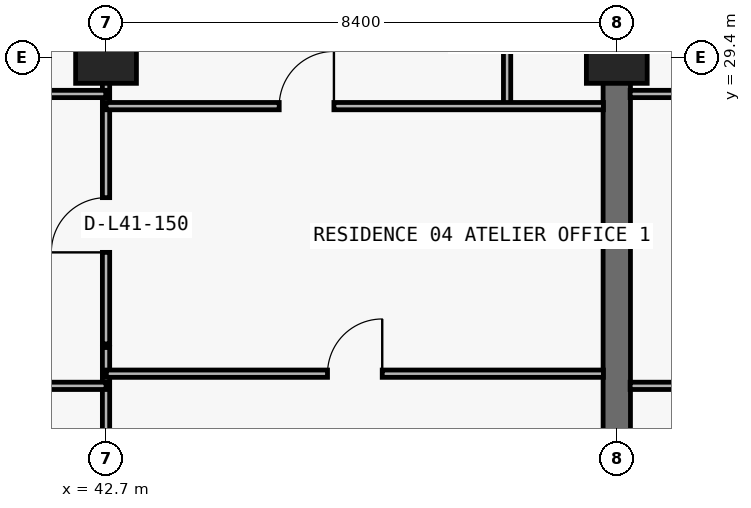
"""IFC4 building model, lengths in metres.
Left out: names, types, materials, properties, quantities, classifications, styles, units other than length and angle.
Written with IfcOpenShell. Run it as: python <this file> out.ifc"""

import sys

from ifc_helpers import new_model, si_unit, direction, frame, frame_2d, origin, origin_2d, place, context, subcontext, project, spatial, rectangle, extrude, element, fill, save


model = new_model("IFC4")
c1 = context("Model", 3, precision=1e-05, world=origin(), true_north=direction((0.0, 1.0)))
c2 = subcontext(c1, "Body", "Model", "MODEL_VIEW")
j1 = project(units=[si_unit("LENGTHUNIT", "METRE"), si_unit("PLANEANGLEUNIT", "RADIAN")], contexts=[c1])
p1 = place(None, origin())
s1 = spatial("IfcSite", under=j1, at=p1, CompositionType="ELEMENT")
p2 = place(p1, origin())
s2 = spatial("IfcBuilding", under=s1, at=p2, CompositionType="ELEMENT")
p3 = place(p2, frame((0.0, 0.0, 148.8)))
s3 = spatial("IfcBuildingStorey", under=s2, at=p3, CompositionType="ELEMENT", Elevation=148.8)
for number, where, z_axis, x_axis in (
    (1, (42.7, 29.4, 0.0), (0.0, 0.0, 1.0), (1.0, 0.0, 0.0)),
    (2, (51.1, 29.4, 0.0), (0.0, 0.0, 1.0), (1.0, 0.0, 0.0)),
):
    element("IfcColumn", number, at=place(p3, frame(where, z_axis=z_axis, x_axis=x_axis)), inside=s3, PredefinedType="COLUMN", context=c2, shape_type="SweptSolid", body=[
        extrude(rectangle(XDim=1.0, YDim=0.85, at=origin_2d()), origin(), (0.0, 0.0, 1.0), 3.0),
    ])
p4 = place(p3, frame((51.1, 20.8, 0.0), z_axis=(0.0, 0.0, 1.0), x_axis=(0.0, 1.0, 0.0)))
e3 = element("IfcWall", 3, at=p4, inside=s3, PredefinedType="SHEAR", context=c2, shape_type="SweptSolid", body=[
    extrude(rectangle(XDim=8.6, YDim=0.45, at=frame_2d((4.3, 0.0))), origin(), (0.0, 0.0, 1.0), 3.0),
])
p5 = place(p3, frame((42.7, 8.84, 0.0), z_axis=(0.0, 0.0, 1.0), x_axis=(0.0, 1.0, 0.0)))
e4 = element("IfcWall", 4, at=p5, inside=s3, PredefinedType="PARTITIONING", context=c2, shape_type="SweptSolid", body=[
    extrude(rectangle(XDim=15.79, YDim=0.12, at=frame_2d((7.895, 0.0))), origin(), (0.0, 0.0, 1.0), 2.124),
])
p6 = place(p3, frame((42.7, 24.69, 0.0), z_axis=(0.0, 0.0, 1.0), x_axis=(0.0, 1.0, 0.0)))
e5 = element("IfcWall", 5, at=p6, inside=s3, PredefinedType="PARTITIONING", context=c2, shape_type="SweptSolid", body=[
    extrude(rectangle(XDim=5.09, YDim=0.12, at=frame_2d((2.545, 0.0))), origin(), (0.0, 0.0, 1.0), 2.124),
])
p7 = place(p6, frame((1.505, 0.0, 0.0)))
e6 = element("IfcOpeningElement", 6, at=p7, cuts=e5, PredefinedType="OPENING", context=c2, shape_type="SweptSolid", body=[
    extrude(rectangle(XDim=0.9, YDim=2.074, at=frame_2d((0.45, 1.037))), frame((0.0, 0.07, 0.0), z_axis=(0.0, -1.0, 0.0), x_axis=(1.0, 0.0, 0.0)), (0.0, 0.0, 1.0), 0.14),
])
p8 = place(p3, frame((49.296, 28.6, 0.0), z_axis=(0.0, 0.0, 1.0), x_axis=(0.0, 1.0, 0.0)))
e7 = element("IfcWall", 7, at=p8, inside=s3, PredefinedType="PARTITIONING", context=c2, shape_type="SweptSolid", body=[
    extrude(rectangle(XDim=1.18, YDim=0.12, at=frame_2d((0.59, 0.0))), origin(), (0.0, 0.0, 1.0), 2.629),
])
p9 = place(p3, frame((51.1, 29.405, 0.0), z_axis=(0.0, 0.0, 1.0), x_axis=(0.0, 1.0, 0.0)))
e8 = element("IfcWall", 8, at=p9, inside=s3, PredefinedType="PARTITIONING", context=c2, shape_type="SweptSolid", body=[
    extrude(rectangle(XDim=0.375, YDim=0.2, at=frame_2d((0.188, 0.0))), origin(), (0.0, 0.0, 1.0), 3.0),
])
p10 = place(p3, frame((35.1, 24.0, 0.0), z_axis=(0.0, 0.0, 1.0), x_axis=(1.0, 0.0, 0.0)))
e9 = element("IfcWall", 9, at=p10, inside=s3, PredefinedType="PARTITIONING", context=c2, shape_type="SweptSolid", body=[
    extrude(rectangle(XDim=7.6, YDim=0.12, at=frame_2d((3.8, 0.0))), origin(), (0.0, 0.0, 1.0), 3.0),
])
p11 = place(p10, frame((3.35, 0.0, 0.0)))
e10 = element("IfcOpeningElement", 10, at=p11, cuts=e9, PredefinedType="OPENING", context=c2, shape_type="SweptSolid", body=[
    extrude(rectangle(XDim=0.9, YDim=2.15, at=frame_2d((0.45, 1.075))), frame((0.0, 0.07, 0.0), z_axis=(0.0, -1.0, 0.0), x_axis=(1.0, 0.0, 0.0)), (0.0, 0.0, 1.0), 0.14),
])
p12 = place(p3, frame((51.32, 24.0, 0.0), z_axis=(0.0, 0.0, 1.0), x_axis=(1.0, 0.0, 0.0)))
e11 = element("IfcWall", 11, at=p12, inside=s3, PredefinedType="PARTITIONING", context=c2, shape_type="SweptSolid", body=[
    extrude(rectangle(XDim=8.18, YDim=0.12, at=frame_2d((4.09, 0.0))), origin(), (0.0, 0.0, 1.0), 3.0),
])
p13 = place(p12, frame((1.33, 0.0, 0.0)))
e12 = element("IfcOpeningElement", 12, at=p13, cuts=e11, PredefinedType="OPENING", context=c2, shape_type="SweptSolid", body=[
    extrude(rectangle(XDim=0.9, YDim=2.15, at=frame_2d((0.45, 1.075))), frame((0.0, 0.07, 0.0), z_axis=(0.0, -1.0, 0.0), x_axis=(1.0, 0.0, 0.0)), (0.0, 0.0, 1.0), 0.14),
])
p14 = place(p3, frame((42.705, 24.2, 0.0), z_axis=(0.0, 0.0, 1.0), x_axis=(1.0, 0.0, 0.0)))
e13 = element("IfcWall", 13, at=p14, inside=s3, PredefinedType="PARTITIONING", context=c2, shape_type="SweptSolid", body=[
    extrude(rectangle(XDim=8.175, YDim=0.12, at=frame_2d((4.087, 0.0))), origin(), (0.0, 0.0, 1.0), 3.0),
])
p15 = place(p14, frame((3.637, 0.0, 0.0)))
e14 = element("IfcOpeningElement", 14, at=p15, cuts=e13, PredefinedType="OPENING", context=c2, shape_type="SweptSolid", body=[
    extrude(rectangle(XDim=0.9, YDim=2.15, at=frame_2d((0.45, 1.075))), frame((0.0, 0.07, 0.0), z_axis=(0.0, -1.0, 0.0), x_axis=(1.0, 0.0, 0.0)), (0.0, 0.0, 1.0), 0.14),
])
p16 = place(p3, frame((42.7, 28.6, 0.0), z_axis=(0.0, 0.0, 1.0), x_axis=(1.0, 0.0, 0.0)))
e15 = element("IfcWall", 15, at=p16, inside=s3, PredefinedType="PARTITIONING", context=c2, shape_type="SweptSolid", body=[
    extrude(rectangle(XDim=8.18, YDim=0.12, at=frame_2d((4.09, 0.0))), origin(), (0.0, 0.0, 1.0), 3.0),
])
p17 = place(p16, frame((2.848, 0.0, 0.0)))
e16 = element("IfcOpeningElement", 16, at=p17, cuts=e15, PredefinedType="OPENING", context=c2, shape_type="SweptSolid", body=[
    extrude(rectangle(XDim=0.9, YDim=2.15, at=frame_2d((0.45, 1.075))), frame((0.0, 0.07, 0.0), z_axis=(0.0, -1.0, 0.0), x_axis=(1.0, 0.0, 0.0)), (0.0, 0.0, 1.0), 0.14),
])
p18 = place(p3, frame((35.1, 28.8, 0.0), z_axis=(0.0, 0.0, 1.0), x_axis=(1.0, 0.0, 0.0)))
e17 = element("IfcWall", 17, at=p18, inside=s3, PredefinedType="PARTITIONING", context=c2, shape_type="SweptSolid", body=[
    extrude(rectangle(XDim=7.595, YDim=0.12, at=frame_2d((3.797, 0.0))), origin(), (0.0, 0.0, 1.0), 3.0),
])
p19 = place(p18, frame((2.442, 0.0, 0.0)))
e18 = element("IfcOpeningElement", 18, at=p19, cuts=e17, PredefinedType="OPENING", context=c2, shape_type="SweptSolid", body=[
    extrude(rectangle(XDim=0.9, YDim=2.15, at=frame_2d((0.45, 1.075))), frame((0.0, 0.07, 0.0), z_axis=(0.0, -1.0, 0.0), x_axis=(1.0, 0.0, 0.0)), (0.0, 0.0, 1.0), 0.14),
])
p20 = place(p3, frame((51.32, 28.8, 0.0), z_axis=(0.0, 0.0, 1.0), x_axis=(1.0, 0.0, 0.0)))
e19 = element("IfcWall", 19, at=p20, inside=s3, PredefinedType="PARTITIONING", context=c2, shape_type="SweptSolid", body=[
    extrude(rectangle(XDim=8.18, YDim=0.12, at=frame_2d((4.09, 0.0))), origin(), (0.0, 0.0, 1.0), 3.0),
])
p21 = place(p20, frame((1.33, 0.0, 0.0)))
e20 = element("IfcOpeningElement", 20, at=p21, cuts=e19, PredefinedType="OPENING", context=c2, shape_type="SweptSolid", body=[
    extrude(rectangle(XDim=0.9, YDim=2.15, at=frame_2d((0.45, 1.075))), frame((0.0, 0.07, 0.0), z_axis=(0.0, -1.0, 0.0), x_axis=(1.0, 0.0, 0.0)), (0.0, 0.0, 1.0), 0.14),
])
p22 = place(p7, origin())
e21 = element("IfcDoor", 21, at=p22, inside=s3, OperationType="SINGLE_SWING_LEFT", PredefinedType="DOOR", context=c2, shape_type="SweptSolid", body=[
    extrude(rectangle(XDim=0.9, YDim=2.074, at=frame_2d((0.45, 1.037))), frame((0.0, 0.025, 0.0), z_axis=(0.0, -1.0, 0.0), x_axis=(1.0, 0.0, 0.0)), (0.0, 0.0, 1.0), 0.05),
])
fill(e6, e21)
p23 = place(p17, origin())
e22 = element("IfcDoor", 22, at=p23, inside=s3, OperationType="SINGLE_SWING_RIGHT", PredefinedType="DOOR", context=c2, shape_type="SweptSolid", body=[
    extrude(rectangle(XDim=0.9, YDim=2.15, at=frame_2d((0.45, 1.075))), frame((0.0, 0.025, 0.0), z_axis=(0.0, -1.0, 0.0), x_axis=(1.0, 0.0, 0.0)), (0.0, 0.0, 1.0), 0.05),
])
fill(e16, e22)
p24 = place(p15, origin())
e23 = element("IfcDoor", 23, at=p24, inside=s3, OperationType="SINGLE_SWING_RIGHT", PredefinedType="DOOR", context=c2, shape_type="SweptSolid", body=[
    extrude(rectangle(XDim=0.9, YDim=2.15, at=frame_2d((0.45, 1.075))), frame((0.0, 0.025, 0.0), z_axis=(0.0, -1.0, 0.0), x_axis=(1.0, 0.0, 0.0)), (0.0, 0.0, 1.0), 0.05),
])
fill(e14, e23)
save(model, sys.argv[1])
